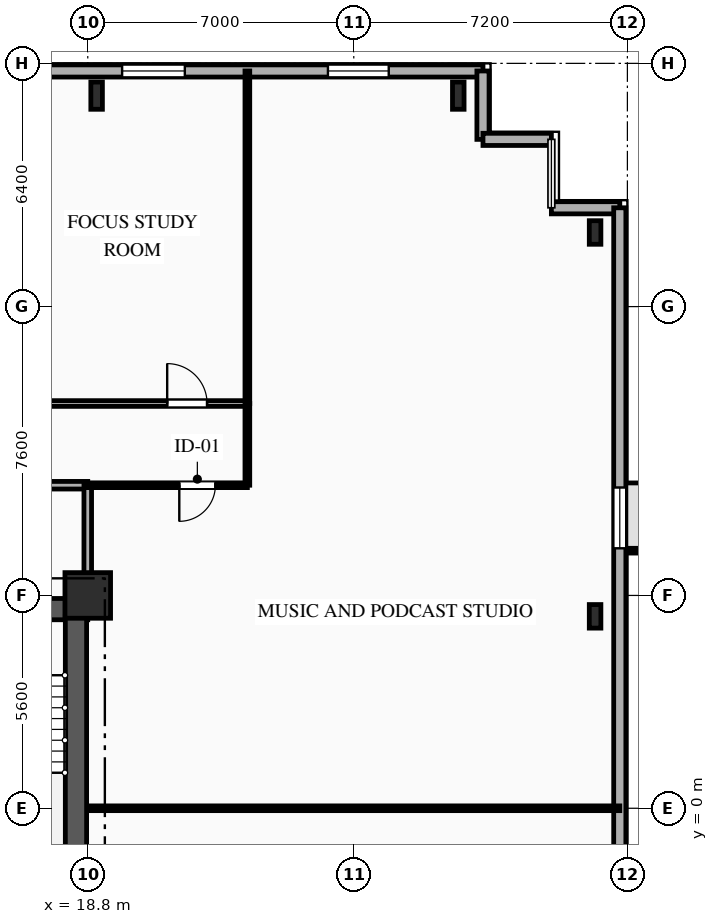
"""IFC4 building model, lengths in metres.
Left out: names, types, materials, properties, quantities, classifications, styles, units other than length and angle.
Written with IfcOpenShell. Run it as: python <this file> out.ifc"""

import sys

from ifc_helpers import new_model, si_unit, direction, frame, frame_2d, origin, origin_2d, place, context, subcontext, project, spatial, rectangle, i_section, extrude, element, fill, save


model = new_model("IFC4")
c1 = context("Model", 3, precision=1e-05, world=origin(), true_north=direction((0.0, 1.0)))
c2 = subcontext(c1, "Body", "Model", "MODEL_VIEW")
j1 = project(units=[si_unit("LENGTHUNIT", "METRE"), si_unit("PLANEANGLEUNIT", "RADIAN")], contexts=[c1])
p1 = place(None, origin())
s1 = spatial("IfcSite", under=j1, at=p1, CompositionType="ELEMENT")
p2 = place(p1, origin())
s2 = spatial("IfcBuilding", under=s1, at=p2, CompositionType="ELEMENT")
p3 = place(p2, frame((0.0, 0.0, 63.85)))
s3 = spatial("IfcBuildingStorey", under=s2, at=p3, CompositionType="ELEMENT", Elevation=63.85)
p4 = place(p3, frame((18.8, 5.6, 0.0), z_axis=(0.0, 0.0, 1.0), x_axis=(1.0, 0.0, 0.0)))
e1 = element("IfcColumn", 1, at=p4, inside=s3, PredefinedType="COLUMN", context=c2, shape_type="SweptSolid", body=[
    extrude(rectangle(XDim=1.2, YDim=1.2, at=origin_2d()), origin(), (0.0, 0.0, 1.0), 3.35),
])
for number, where, z_axis, x_axis in (
    (2, (28.55, 18.75, 0.0), (0.0, 0.0, 1.0), (1.0, 0.0, 0.0)),
    (3, (19.033, 18.75, 0.0), (0.0, 0.0, 1.0), (1.0, 0.0, 0.0)),
):
    element("IfcColumn", number, at=place(p3, frame(where, z_axis=z_axis, x_axis=x_axis)), inside=s3, PredefinedType="COLUMN", context=c2, shape_type="SweptSolid", body=[
        extrude(i_section(OverallWidth=0.304, OverallDepth=0.716, WebThickness=0.021, FlangeThickness=0.04, FilletRadius=0.027, at=origin_2d()), origin(), (0.0, 0.0, 1.0), 3.35),
    ])
for number, where, z_axis, x_axis in (
    (4, (32.15, 5.05, 0.0), (0.0, 0.0, 1.0), (1.0, 0.0, 0.0)),
    (5, (32.15, 15.15, 0.0), (0.0, 0.0, 1.0), (1.0, 0.0, 0.0)),
):
    element("IfcColumn", number, at=place(p3, frame(where, z_axis=z_axis, x_axis=x_axis)), inside=s3, PredefinedType="COLUMN", context=c2, shape_type="SweptSolid", body=[
        extrude(i_section(OverallWidth=0.305, OverallDepth=0.62, WebThickness=0.021, FlangeThickness=0.04, FilletRadius=0.027, at=origin_2d()), origin(), (0.0, 0.0, 1.0), 3.35),
    ])
p5 = place(p3, frame((-29.2, 19.4, 0.0), z_axis=(0.0, 0.0, 1.0), x_axis=(1.0, 0.0, 0.0)))
e6 = element("IfcWall", 6, at=p5, inside=s3, PredefinedType="SOLIDWALL", context=c2, shape_type="SweptSolid", body=[
    extrude(rectangle(XDim=58.4, YDim=0.32, at=frame_2d((29.2, 0.0))), origin(), (0.0, 0.0, 1.0), 3.035),
])
p6 = place(p5, frame((1.255, 0.0, 0.85)))
e7 = element("IfcOpeningElement", 7, at=p6, cuts=e6, PredefinedType="OPENING", context=c2, shape_type="SweptSolid", body=[
    extrude(rectangle(XDim=1.65, YDim=1.85, at=frame_2d((0.825, 0.925))), frame((0.0, 0.17, 0.0), z_axis=(0.0, -1.0, 0.0), x_axis=(1.0, 0.0, 0.0)), (0.0, 0.0, 1.0), 0.34),
])
p7 = place(p5, frame((4.26, 0.0, 0.85)))
e8 = element("IfcOpeningElement", 8, at=p7, cuts=e6, PredefinedType="OPENING", context=c2, shape_type="SweptSolid", body=[
    extrude(rectangle(XDim=1.4, YDim=1.85, at=frame_2d((0.7, 0.925))), frame((0.0, 0.17, 0.0), z_axis=(0.0, -1.0, 0.0), x_axis=(1.0, 0.0, 0.0)), (0.0, 0.0, 1.0), 0.34),
])
p8 = place(p5, frame((8.135, 0.0, 0.85)))
e9 = element("IfcOpeningElement", 9, at=p8, cuts=e6, PredefinedType="OPENING", context=c2, shape_type="SweptSolid", body=[
    extrude(rectangle(XDim=1.65, YDim=1.85, at=frame_2d((0.825, 0.925))), frame((0.0, 0.17, 0.0), z_axis=(0.0, -1.0, 0.0), x_axis=(1.0, 0.0, 0.0)), (0.0, 0.0, 1.0), 0.34),
])
p9 = place(p5, frame((13.575, 0.0, 0.85)))
e10 = element("IfcOpeningElement", 10, at=p9, cuts=e6, PredefinedType="OPENING", context=c2, shape_type="SweptSolid", body=[
    extrude(rectangle(XDim=1.65, YDim=1.85, at=frame_2d((0.825, 0.925))), frame((0.0, 0.17, 0.0), z_axis=(0.0, -1.0, 0.0), x_axis=(1.0, 0.0, 0.0)), (0.0, 0.0, 1.0), 0.34),
])
p10 = place(p5, frame((23.28, 0.0, 0.85)))
e11 = element("IfcOpeningElement", 11, at=p10, cuts=e6, PredefinedType="OPENING", context=c2, shape_type="SweptSolid", body=[
    extrude(rectangle(XDim=1.6, YDim=1.85, at=frame_2d((0.8, 0.925))), frame((0.0, 0.17, 0.0), z_axis=(0.0, -1.0, 0.0), x_axis=(1.0, 0.0, 0.0)), (0.0, 0.0, 1.0), 0.34),
])
p11 = place(p5, frame((33.3, 0.0, 0.85)))
e12 = element("IfcOpeningElement", 12, at=p11, cuts=e6, PredefinedType="OPENING", context=c2, shape_type="SweptSolid", body=[
    extrude(rectangle(XDim=2.2, YDim=1.85, at=frame_2d((1.1, 0.925))), frame((0.0, 0.17, 0.0), z_axis=(0.0, -1.0, 0.0), x_axis=(1.0, 0.0, 0.0)), (0.0, 0.0, 1.0), 0.34),
])
p12 = place(p5, frame((42.335, 0.0, 0.85)))
e13 = element("IfcOpeningElement", 13, at=p12, cuts=e6, PredefinedType="OPENING", context=c2, shape_type="SweptSolid", body=[
    extrude(rectangle(XDim=1.65, YDim=1.85, at=frame_2d((0.825, 0.925))), frame((0.0, 0.17, 0.0), z_axis=(0.0, -1.0, 0.0), x_axis=(1.0, 0.0, 0.0)), (0.0, 0.0, 1.0), 0.34),
])
p13 = place(p5, frame((48.905, 0.0, 0.85)))
e14 = element("IfcOpeningElement", 14, at=p13, cuts=e6, PredefinedType="OPENING", context=c2, shape_type="SweptSolid", body=[
    extrude(rectangle(XDim=1.65, YDim=1.85, at=frame_2d((0.825, 0.925))), frame((0.0, 0.17, 0.0), z_axis=(0.0, -1.0, 0.0), x_axis=(1.0, 0.0, 0.0)), (0.0, 0.0, 1.0), 0.34),
])
p14 = place(p5, frame((54.32, 0.0, 0.85)))
e15 = element("IfcOpeningElement", 15, at=p14, cuts=e6, PredefinedType="OPENING", context=c2, shape_type="SweptSolid", body=[
    extrude(rectangle(XDim=1.6, YDim=1.85, at=frame_2d((0.8, 0.925))), frame((0.0, 0.17, 0.0), z_axis=(0.0, -1.0, 0.0), x_axis=(1.0, 0.0, 0.0)), (0.0, 0.0, 1.0), 0.34),
])
p15 = place(p3, frame((29.2, 19.4, 0.0), z_axis=(0.0, 0.0, 1.0), x_axis=(0.0, -1.0, 0.0)))
e16 = element("IfcWall", 16, at=p15, inside=s3, PredefinedType="SOLIDWALL", context=c2, shape_type="SweptSolid", body=[
    extrude(rectangle(XDim=1.8, YDim=0.32, at=frame_2d((0.9, 0.0))), origin(), (0.0, 0.0, 1.0), 3.035),
])
for number, where, z_axis, x_axis in (
    (17, (29.2, 17.6, 0.0), (0.0, 0.0, 1.0), (1.0, 0.0, 0.0)),
    (18, (31.0, 15.8, 0.0), (0.0, 0.0, 1.0), (1.0, 0.0, 0.0)),
):
    element("IfcWall", number, at=place(p3, frame(where, z_axis=z_axis, x_axis=x_axis)), inside=s3, PredefinedType="SOLIDWALL", context=c2, shape_type="SweptSolid", body=[
        extrude(rectangle(XDim=1.8, YDim=0.32, at=frame_2d((0.9, 0.0))), origin(), (0.0, 0.0, 1.0), 3.035),
    ])
p16 = place(p3, frame((32.8, 15.8, 0.0), z_axis=(0.0, 0.0, 1.0), x_axis=(0.0, -1.0, 0.0)))
e19 = element("IfcWall", 19, at=p16, inside=s3, PredefinedType="SOLIDWALL", context=c2, shape_type="SweptSolid", body=[
    extrude(rectangle(XDim=31.6, YDim=0.32, at=frame_2d((15.8, 0.0))), origin(), (0.0, 0.0, 1.0), 3.035),
])
p17 = place(p16, frame((7.36, 0.0, 0.85)))
e20 = element("IfcOpeningElement", 20, at=p17, cuts=e19, PredefinedType="OPENING", context=c2, shape_type="SweptSolid", body=[
    extrude(rectangle(XDim=1.6, YDim=1.85, at=frame_2d((0.8, 0.925))), frame((0.0, 0.17, 0.0), z_axis=(0.0, -1.0, 0.0), x_axis=(1.0, 0.0, 0.0)), (0.0, 0.0, 1.0), 0.34),
])
p18 = place(p16, frame((22.695, 0.0, 0.85)))
e21 = element("IfcOpeningElement", 21, at=p18, cuts=e19, PredefinedType="OPENING", context=c2, shape_type="SweptSolid", body=[
    extrude(rectangle(XDim=1.65, YDim=1.85, at=frame_2d((0.825, 0.925))), frame((0.0, 0.17, 0.0), z_axis=(0.0, -1.0, 0.0), x_axis=(1.0, 0.0, 0.0)), (0.0, 0.0, 1.0), 0.34),
])
p19 = place(p3, frame((9.2, 5.24, 0.0), z_axis=(0.0, 0.0, 1.0), x_axis=(1.0, 0.0, 0.0)))
e22 = element("IfcWall", 22, at=p19, inside=s3, PredefinedType="SHEAR", context=c2, shape_type="SweptSolid", body=[
    extrude(rectangle(XDim=9.6, YDim=0.56, at=frame_2d((4.8, 0.0))), origin(), (0.0, 0.0, 1.0), 3.035),
])
p20 = place(p19, frame((6.95, 0.0, 0.0)))
e23 = element("IfcOpeningElement", 23, at=p20, cuts=e22, PredefinedType="OPENING", context=c2, shape_type="SweptSolid", body=[
    extrude(rectangle(XDim=1.1, YDim=2.15, at=frame_2d((0.55, 1.075))), frame((0.0, 0.29, 0.0), z_axis=(0.0, -1.0, 0.0), x_axis=(1.0, 0.0, 0.0)), (0.0, 0.0, 1.0), 0.58),
])
p21 = place(p19, frame((3.775, 0.0, 0.0)))
e24 = element("IfcOpeningElement", 24, at=p21, cuts=e22, PredefinedType="OPENING", context=c2, shape_type="SweptSolid", body=[
    extrude(rectangle(XDim=1.05, YDim=2.1, at=frame_2d((0.525, 1.05))), frame((0.0, 0.29, 0.0), z_axis=(0.0, -1.0, 0.0), x_axis=(1.0, 0.0, 0.0)), (0.0, 0.0, 1.0), 0.58),
])
p22 = place(p3, frame((18.49, -5.05, 0.0), z_axis=(0.0, 0.0, 1.0), x_axis=(0.0, 1.0, 0.0)))
e25 = element("IfcWall", 25, at=p22, inside=s3, PredefinedType="SHEAR", context=c2, shape_type="SweptSolid", body=[
    extrude(rectangle(XDim=10.1, YDim=0.56, at=frame_2d((5.05, 0.0))), origin(), (0.0, 0.0, 1.0), 3.035),
])
p23 = place(p3, frame((18.8, 8.5, 0.0), z_axis=(0.0, 0.0, 1.0), x_axis=(-1.0, 0.0, 0.0)))
e26 = element("IfcWall", 26, at=p23, inside=s3, PredefinedType="PARTITIONING", context=c2, shape_type="SweptSolid", body=[
    extrude(rectangle(XDim=6.8, YDim=0.2, at=frame_2d((3.4, 0.0))), origin(), (0.0, 0.0, 1.0), 3.035),
])
p24 = place(p23, frame((3.985, 0.0, 0.0)))
e27 = element("IfcOpeningElement", 27, at=p24, cuts=e26, PredefinedType="OPENING", context=c2, shape_type="SweptSolid", body=[
    extrude(rectangle(XDim=1.1, YDim=2.15, at=frame_2d((0.55, 1.075))), frame((0.0, 0.11, 0.0), z_axis=(0.0, -1.0, 0.0), x_axis=(1.0, 0.0, 0.0)), (0.0, 0.0, 1.0), 0.22),
])
p25 = place(p3, frame((18.8, 5.6, 0.0), z_axis=(0.0, 0.0, 1.0), x_axis=(0.0, 1.0, 0.0)))
e28 = element("IfcWall", 28, at=p25, inside=s3, PredefinedType="PARTITIONING", context=c2, shape_type="SweptSolid", body=[
    extrude(rectangle(XDim=2.9, YDim=0.2, at=frame_2d((1.45, 0.0))), origin(), (0.0, 0.0, 1.0), 2.52),
])
p26 = place(p3, frame((23.0, 8.5, 0.0), z_axis=(0.0, 0.0, 1.0), x_axis=(-1.0, 0.0, 0.0)))
e29 = element("IfcWall", 29, at=p26, inside=s3, PredefinedType="PARTITIONING", context=c2, shape_type="SweptSolid", body=[
    extrude(rectangle(XDim=4.2, YDim=0.125, at=frame_2d((2.1, 0.0))), origin(), (0.0, 0.0, 1.0), 3.035),
])
p27 = place(p26, frame((0.841, 0.0, 0.0)))
e30 = element("IfcOpeningElement", 30, at=p27, cuts=e29, PredefinedType="OPENING", context=c2, shape_type="SweptSolid", body=[
    extrude(rectangle(XDim=0.95, YDim=2.1, at=frame_2d((0.475, 1.05))), frame((0.0, 0.073, 0.0), z_axis=(0.0, -1.0, 0.0), x_axis=(1.0, 0.0, 0.0)), (0.0, 0.0, 1.0), 0.145),
])
p28 = place(p3, frame((23.0, 10.65, 0.0), z_axis=(0.0, 0.0, 1.0), x_axis=(0.0, -1.0, 0.0)))
e31 = element("IfcWall", 31, at=p28, inside=s3, PredefinedType="PARTITIONING", context=c2, shape_type="SweptSolid", body=[
    extrude(rectangle(XDim=2.15, YDim=0.125, at=frame_2d((1.075, 0.0))), origin(), (0.0, 0.0, 1.0), 3.035),
])
p29 = place(p3, frame((16.95, 10.65, 0.0), z_axis=(0.0, 0.0, 1.0), x_axis=(1.0, 0.0, 0.0)))
e32 = element("IfcWall", 32, at=p29, inside=s3, PredefinedType="PARTITIONING", context=c2, shape_type="SweptSolid", body=[
    extrude(rectangle(XDim=6.05, YDim=0.15, at=frame_2d((3.025, 0.0))), origin(), (0.0, 0.0, 1.0), 3.035),
])
p30 = place(p29, frame((3.94, 0.0, 0.0)))
e33 = element("IfcOpeningElement", 33, at=p30, cuts=e32, PredefinedType="OPENING", context=c2, shape_type="SweptSolid", body=[
    extrude(rectangle(XDim=1.05, YDim=2.15, at=frame_2d((0.525, 1.075))), frame((0.0, 0.085, 0.0), z_axis=(0.0, -1.0, 0.0), x_axis=(1.0, 0.0, 0.0)), (0.0, 0.0, 1.0), 0.17),
])
p31 = place(p3, frame((18.8, 0.0, 0.0), z_axis=(0.0, 0.0, 1.0), x_axis=(1.0, 0.0, 0.0)))
e34 = element("IfcWall", 34, at=p31, inside=s3, PredefinedType="PARTITIONING", context=c2, shape_type="SweptSolid", body=[
    extrude(rectangle(XDim=14.0, YDim=0.125, at=frame_2d((7.0, 0.0))), origin(), (0.0, 0.0, 1.0), 3.035),
])
p32 = place(p3, frame((23.0, 10.65, 0.0), z_axis=(0.0, 0.0, 1.0), x_axis=(0.0, 1.0, 0.0)))
e35 = element("IfcWall", 35, at=p32, inside=s3, PredefinedType="PARTITIONING", context=c2, shape_type="SweptSolid", body=[
    extrude(rectangle(XDim=8.75, YDim=0.125, at=frame_2d((4.375, 0.0))), origin(), (0.0, 0.0, 1.0), 3.035),
])
p33 = place(p13, origin())
e36 = element("IfcWindow", 36, at=p33, inside=s3, PartitioningType="SINGLE_PANEL", PredefinedType="WINDOW", context=c2, shape_type="SweptSolid", body=[
    extrude(rectangle(XDim=1.65, YDim=1.85, at=frame_2d((0.825, 0.925))), frame((0.0, 0.03, 0.0), z_axis=(0.0, -1.0, 0.0), x_axis=(1.0, 0.0, 0.0)), (0.0, 0.0, 1.0), 0.06),
])
fill(e14, e36)
p34 = place(p14, origin())
e37 = element("IfcWindow", 37, at=p34, inside=s3, PartitioningType="SINGLE_PANEL", PredefinedType="WINDOW", context=c2, shape_type="SweptSolid", body=[
    extrude(rectangle(XDim=1.6, YDim=1.85, at=frame_2d((0.8, 0.925))), frame((0.0, 0.03, 0.0), z_axis=(0.0, -1.0, 0.0), x_axis=(1.0, 0.0, 0.0)), (0.0, 0.0, 1.0), 0.06),
])
fill(e15, e37)
p35 = place(p17, origin())
e38 = element("IfcWindow", 38, at=p35, inside=s3, PartitioningType="SINGLE_PANEL", PredefinedType="WINDOW", context=c2, shape_type="SweptSolid", body=[
    extrude(rectangle(XDim=1.6, YDim=1.85, at=frame_2d((0.8, 0.925))), frame((0.0, 0.03, 0.0), z_axis=(0.0, -1.0, 0.0), x_axis=(1.0, 0.0, 0.0)), (0.0, 0.0, 1.0), 0.06),
])
fill(e20, e38)
p36 = place(p27, origin())
e39 = element("IfcDoor", 39, at=p36, inside=s3, OperationType="SINGLE_SWING_RIGHT", PredefinedType="DOOR", context=c2, shape_type="SweptSolid", body=[
    extrude(rectangle(XDim=0.95, YDim=2.1, at=frame_2d((0.475, 1.05))), frame((0.0, 0.025, 0.0), z_axis=(0.0, -1.0, 0.0), x_axis=(1.0, 0.0, 0.0)), (0.0, 0.0, 1.0), 0.05),
])
fill(e30, e39)
p37 = place(p30, origin())
e40 = element("IfcDoor", 40, at=p37, inside=s3, OperationType="SINGLE_SWING_LEFT", PredefinedType="DOOR", context=c2, shape_type="SweptSolid", body=[
    extrude(rectangle(XDim=1.05, YDim=2.15, at=frame_2d((0.525, 1.075))), frame((0.0, 0.025, 0.0), z_axis=(0.0, -1.0, 0.0), x_axis=(1.0, 0.0, 0.0)), (0.0, 0.0, 1.0), 0.05),
])
fill(e33, e40)
save(model, sys.argv[1])
